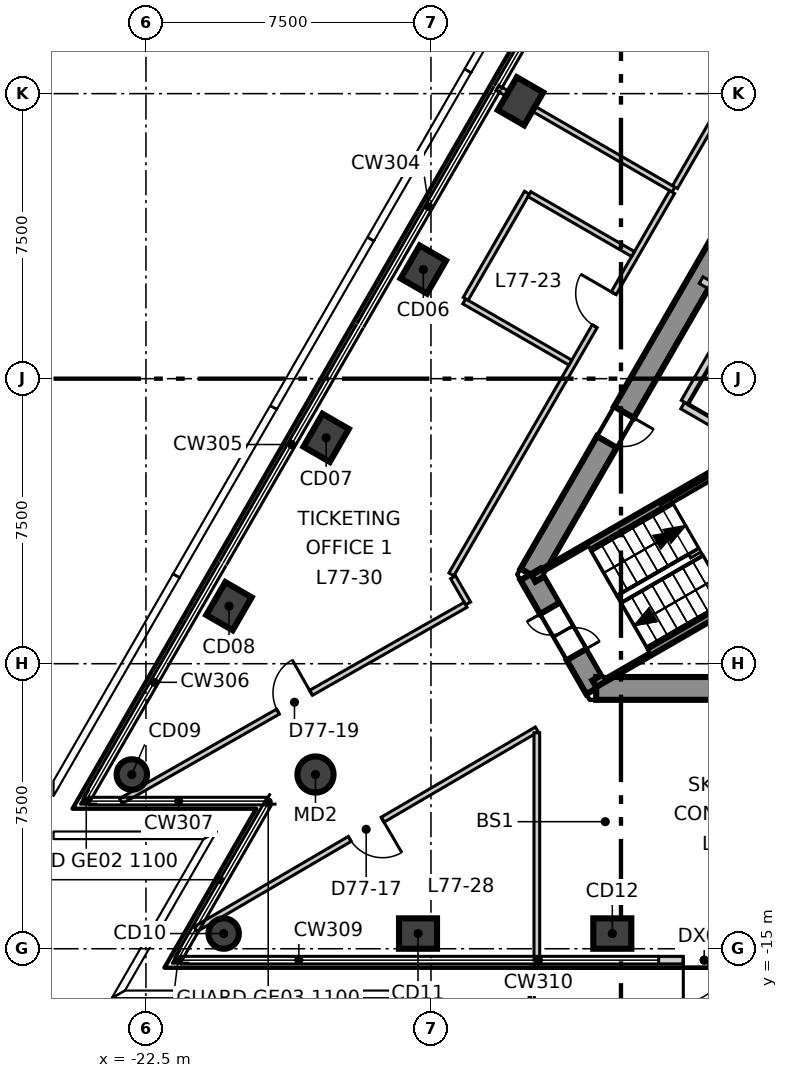
"""IFC4 building model, lengths in metres.
Left out: names, types, materials, properties, quantities, classifications, styles, units other than length and angle.
Written with IfcOpenShell. Run it as: python <this file> out.ifc"""

import sys

from ifc_helpers import new_model, si_unit, direction, frame, frame_2d, origin, origin_2d, place, context, subcontext, project, spatial, polyline, rectangle, circle, outline, extrude, element, fill, save


model = new_model("IFC4")
c1 = context("Model", 3, precision=1e-05, world=origin(), true_north=direction((0.0, 1.0)))
c2 = subcontext(c1, "Body", "Model", "MODEL_VIEW")
j1 = project(units=[si_unit("LENGTHUNIT", "METRE"), si_unit("PLANEANGLEUNIT", "RADIAN")], contexts=[c1])
p1 = place(None, origin())
s1 = spatial("IfcSite", under=j1, at=p1, CompositionType="ELEMENT")
p2 = place(p1, origin())
s2 = spatial("IfcBuilding", under=s1, at=p2, CompositionType="ELEMENT")
p3 = place(p2, frame((0.0, 0.0, 322.3)))
s3 = spatial("IfcBuildingStorey", under=s2, at=p3, CompositionType="ELEMENT", Elevation=322.3)
p4 = place(p3, frame((-1.732, 13.3, -0.3), z_axis=(0.0, 0.0, 1.0), x_axis=(-0.500000539815, -0.866025092122, 0.0)))
e1 = element("IfcWall", 1, at=p4, inside=s3, PredefinedType="SHEAR", context=c2, shape_type="SweptSolid", body=[
    extrude(outline(polyline([(-0.173, -0.3), (1.795, -0.3), (3.763, -0.3), (5.732, -0.3), (7.7, -0.3), (9.668, -0.301), (11.637, -0.301), (13.605, -0.301), (15.573, -0.301), (17.542, -0.301), (19.51, -0.301), (21.478, -0.301), (21.131, 0.3), (19.226, 0.3), (17.321, 0.3), (15.415, 0.3), (13.51, 0.3), (11.605, 0.3), (9.699, 0.3), (7.794, 0.3), (5.889, 0.3), (3.984, 0.3), (2.078, 0.3), (0.173, 0.3), (-0.173, -0.3)])), origin(), (0.0, 0.0, 1.0), 5.35),
])
p5 = place(p4, frame((10.102, 0.0, 0.3)))
e2 = element("IfcOpeningElement", 2, at=p5, cuts=e1, PredefinedType="OPENING", context=c2, shape_type="SweptSolid", body=[
    extrude(rectangle(XDim=1.1, YDim=2.1, at=frame_2d((0.55, 1.05))), frame((0.0, 0.31, 0.0), z_axis=(0.0, -1.0, 0.0), x_axis=(1.0, 0.0, 0.0)), (0.0, 0.0, 1.0), 0.621),
])
p6 = place(p4, frame((16.378, 0.0, 0.3)))
e3 = element("IfcOpeningElement", 3, at=p6, cuts=e1, PredefinedType="OPENING", context=c2, shape_type="SweptSolid", body=[
    extrude(rectangle(XDim=0.9, YDim=2.1, at=frame_2d((0.45, 1.05))), frame((0.0, 0.31, 0.0), z_axis=(0.0, -1.0, 0.0), x_axis=(1.0, 0.0, 0.0)), (0.0, 0.0, 1.0), 0.621),
])
p7 = place(p3, frame((-12.384, -5.15, -0.3), z_axis=(0.0, 0.0, 1.0), x_axis=(0.49997462182, -0.866040055388, 0.0)))
e4 = element("IfcWall", 4, at=p7, inside=s3, PredefinedType="SHEAR", context=c2, shape_type="SweptSolid", body=[
    extrude(outline(polyline([(-0.173, -0.301), (1.732, -0.301), (3.637, -0.3), (3.291, 0.3), (1.732, 0.3), (0.173, 0.3), (-0.173, -0.301)])), origin(), (0.0, 0.0, 1.0), 5.35),
])
p8 = place(p7, frame((1.032, 0.0, 0.3)))
e5 = element("IfcOpeningElement", 5, at=p8, cuts=e4, PredefinedType="OPENING", context=c2, shape_type="SweptSolid", body=[
    extrude(rectangle(XDim=1.4, YDim=2.1, at=frame_2d((0.7, 1.05))), frame((0.0, 0.31, 0.0), z_axis=(0.0, -1.0, 0.0), x_axis=(1.0, 0.0, 0.0)), (0.0, 0.0, 1.0), 0.621),
])
p9 = place(p3, frame((-10.652, -8.15, -0.3), z_axis=(0.0, 0.0, 1.0), x_axis=(1.0, 0.0, 0.0)))
e6 = element("IfcWall", 6, at=p9, inside=s3, PredefinedType="SHEAR", context=c2, shape_type="SweptSolid", body=[
    extrude(outline(polyline([(-0.173, -0.3), (1.795, -0.3), (3.763, -0.3), (5.731, -0.3), (7.7, -0.3), (9.668, -0.3), (11.636, -0.3), (13.604, -0.3), (15.573, -0.3), (17.541, -0.3), (19.509, -0.3), (21.477, -0.3), (21.131, 0.3), (19.226, 0.3), (17.321, 0.3), (15.415, 0.3), (13.51, 0.3), (11.605, 0.3), (9.699, 0.3), (7.794, 0.3), (5.889, 0.3), (3.984, 0.3), (2.078, 0.3), (0.173, 0.3), (-0.173, -0.3)])), origin(), (0.0, 0.0, 1.0), 5.35),
])
p10 = place(p9, frame((9.752, 0.0, 0.3)))
e7 = element("IfcOpeningElement", 7, at=p10, cuts=e6, PredefinedType="OPENING", context=c2, shape_type="SweptSolid", body=[
    extrude(rectangle(XDim=1.8, YDim=2.1, at=frame_2d((0.9, 1.05))), frame((0.0, 0.31, 0.0), z_axis=(0.0, -1.0, 0.0), x_axis=(1.0, 0.0, 0.0)), (0.0, 0.0, 1.0), 0.62),
])
p11 = place(p9, frame((4.026, 0.0, 0.3)))
e8 = element("IfcOpeningElement", 8, at=p11, cuts=e6, PredefinedType="OPENING", context=c2, shape_type="SweptSolid", body=[
    extrude(rectangle(XDim=0.9, YDim=2.1, at=frame_2d((0.45, 1.05))), frame((0.0, 0.31, 0.0), z_axis=(0.0, -1.0, 0.0), x_axis=(1.0, 0.0, 0.0)), (0.0, 0.0, 1.0), 0.62),
])
for number, where, z_axis, x_axis in (
    (9, (-12.644, 7.3, -0.3), (0.0, 0.0, 1.0), (0.5, 0.866, 0.0)),
    (10, (-15.201, 2.871, -0.3), (0.0, 0.0, 1.0), (0.5, 0.866, 0.0)),
    (11, (-17.758, -1.557, -0.3), (0.0, 0.0, 1.0), (0.5, 0.866, 0.0)),
    (12, (-20.315, -5.986, -0.3), (0.0, 0.0, 1.0), (0.5, 0.866, 0.0)),
):
    element("IfcColumn", number, at=place(p3, frame(where, z_axis=z_axis, x_axis=x_axis)), inside=s3, PredefinedType="COLUMN", context=c2, shape_type="SweptSolid", body=[
        extrude(rectangle(XDim=1.0, YDim=0.8, at=origin_2d()), origin(), (0.0, 0.0, 1.0), 5.35),
    ])
for number, where, z_axis, x_axis in (
    (13, (-22.872, -10.415, -0.3), (0.0, 0.0, 1.0), (0.5, 0.866, 0.0)),
    (14, (-20.455, -14.6, -0.3), (0.0, 0.0, 1.0), (1.0, 0.0, 0.0)),
):
    element("IfcColumn", number, at=place(p3, frame(where, z_axis=z_axis, x_axis=x_axis)), inside=s3, PredefinedType="COLUMN", context=c2, shape_type="SweptSolid", body=[
        extrude(circle(Radius=0.4, at=origin_2d()), origin(), (0.0, 0.0, 1.0), 5.35),
    ])
for number, where, z_axis, x_axis in (
    (15, (-15.341, -14.6, -0.3), (0.0, 0.0, 1.0), (1.0, 0.0, 0.0)),
    (16, (-10.228, -14.6, -0.3), (0.0, 0.0, 1.0), (1.0, 0.0, 0.0)),
):
    element("IfcColumn", number, at=place(p3, frame(where, z_axis=z_axis, x_axis=x_axis)), inside=s3, PredefinedType="COLUMN", context=c2, shape_type="SweptSolid", body=[
        extrude(rectangle(XDim=1.0, YDim=0.8, at=origin_2d()), origin(), (0.0, 0.0, 1.0), 5.35),
    ])
p12 = place(p3, frame((-18.039, -10.415, -0.3), z_axis=(0.0, 0.0, 1.0), x_axis=(1.0, 0.0, 0.0)))
e17 = element("IfcColumn", 17, at=p12, inside=s3, PredefinedType="COLUMN", context=c2, shape_type="SweptSolid", body=[
    extrude(circle(Radius=0.475, at=origin_2d()), origin(), (0.0, 0.0, 1.0), 5.35),
])
p13 = place(p3, frame((-9.01, -15.3, 0.0), z_axis=(0.0, 0.0, 1.0), x_axis=(1.0, 0.0, 0.0)))
e18 = element("IfcWall", 18, at=p13, inside=s3, PredefinedType="ELEMENTEDWALL", context=c2, shape_type="SweptSolid", body=[
    extrude(rectangle(XDim=2.4, YDim=0.2, at=frame_2d((1.2, 0.0))), origin(), (0.0, 0.0, 1.0), 5.05),
])
p14 = place(p13, frame((0.65, 0.0, 0.0)))
e19 = element("IfcOpeningElement", 19, at=p14, cuts=e18, PredefinedType="OPENING", context=c2, shape_type="SweptSolid", body=[
    extrude(rectangle(XDim=1.1, YDim=2.4, at=frame_2d((0.55, 1.2))), frame((0.0, 0.11, 0.0), z_axis=(0.0, -1.0, 0.0), x_axis=(1.0, 0.0, 0.0)), (0.0, 0.0, 1.0), 0.22),
])
p15 = place(p3, frame((-13.25, 7.65, 0.0), z_axis=(0.0, 0.0, 1.0), x_axis=(0.866032834954, -0.499987128616, 0.0)))
e20 = element("IfcWall", 20, at=p15, inside=s3, PredefinedType="PARTITIONING", context=c2, shape_type="SweptSolid", body=[
    extrude(rectangle(XDim=5.35, YDim=0.15, at=frame_2d((2.675, 0.0))), origin(), (0.0, 0.0, 1.0), 5.05),
])
p16 = place(p3, frame((-8.579, 5.04, 0.0), z_axis=(0.0, 0.0, 1.0), x_axis=(0.499960750514, 0.8660480633, 0.0)))
e21 = element("IfcWall", 21, at=p16, inside=s3, PredefinedType="PARTITIONING", context=c2, shape_type="SweptSolid", body=[
    extrude(rectangle(XDim=11.529, YDim=0.15, at=frame_2d((5.765, 0.0))), origin(), (0.0, 0.0, 1.0), 5.05),
])
p17 = place(p16, frame((5.17, 0.0, 0.0)))
e22 = element("IfcOpeningElement", 22, at=p17, cuts=e21, PredefinedType="OPENING", context=c2, shape_type="SweptSolid", body=[
    extrude(rectangle(XDim=1.2, YDim=2.1, at=frame_2d((0.6, 1.05))), frame((0.0, 0.085, 0.0), z_axis=(0.0, -1.0, 0.0), x_axis=(1.0, 0.0, 0.0)), (0.0, 0.0, 1.0), 0.17),
])
p18 = place(p3, frame((-14.463, -5.15, 0.0), z_axis=(0.0, 0.0, 1.0), x_axis=(0.50005173435, 0.865995532883, 0.0)))
e23 = element("IfcWall", 23, at=p18, inside=s3, PredefinedType="PARTITIONING", context=c2, shape_type="SweptSolid", body=[
    extrude(rectangle(XDim=11.616, YDim=0.15, at=frame_2d((5.808, 0.0))), origin(), (0.0, 0.0, 1.0), 5.05),
])
p19 = place(p18, frame((7.542, 0.0, 0.0)))
e24 = element("IfcOpeningElement", 24, at=p19, cuts=e23, PredefinedType="OPENING", context=c2, shape_type="SweptSolid", body=[
    extrude(rectangle(XDim=1.0, YDim=2.1, at=frame_2d((0.5, 1.05))), frame((0.0, 0.085, 0.0), z_axis=(0.0, -1.0, 0.0), x_axis=(1.0, 0.0, 0.0)), (0.0, 0.0, 1.0), 0.17),
])
p20 = place(p3, frame((-14.419, -5.225, 0.0), z_axis=(0.0, 0.0, 1.0), x_axis=(0.500308355439, -0.865847301479, 0.0)))
e25 = element("IfcWall", 25, at=p20, inside=s3, PredefinedType="PARTITIONING", context=c2, shape_type="SweptSolid", body=[
    extrude(rectangle(XDim=0.793, YDim=0.15, at=frame_2d((0.397, 0.0))), origin(), (0.0, 0.0, 1.0), 5.05),
])
p21 = place(p3, frame((-23.16, -11.115, 0.0), z_axis=(0.0, 0.0, 1.0), x_axis=(0.869024974593, 0.494768222032, 0.0)))
e26 = element("IfcWall", 26, at=p21, inside=s3, PredefinedType="PARTITIONING", context=c2, shape_type="SweptSolid", body=[
    extrude(rectangle(XDim=10.439, YDim=0.15, at=frame_2d((5.22, 0.0))), origin(), (0.0, 0.0, 1.0), 5.05),
])
p22 = place(p21, frame((4.757, 0.0, 0.0)))
e27 = element("IfcOpeningElement", 27, at=p22, cuts=e26, PredefinedType="OPENING", context=c2, shape_type="SweptSolid", body=[
    extrude(rectangle(XDim=1.0, YDim=2.1, at=frame_2d((0.5, 1.05))), frame((0.0, 0.085, 0.0), z_axis=(0.0, -1.0, 0.0), x_axis=(1.0, 0.0, 0.0)), (0.0, 0.0, 1.0), 0.17),
])
p23 = place(p3, frame((-21.197, -14.485, 0.0), z_axis=(0.0, 0.0, 1.0), x_axis=(0.863146898816, 0.504952899848, 0.0)))
e28 = element("IfcWall", 28, at=p23, inside=s3, PredefinedType="PARTITIONING", context=c2, shape_type="SweptSolid", body=[
    extrude(rectangle(XDim=10.407, YDim=0.15, at=frame_2d((5.204, 0.0))), origin(), (0.0, 0.0, 1.0), 5.05),
])
p24 = place(p23, frame((4.704, 0.0, 0.0)))
e29 = element("IfcOpeningElement", 29, at=p24, cuts=e28, PredefinedType="OPENING", context=c2, shape_type="SweptSolid", body=[
    extrude(rectangle(XDim=1.0, YDim=2.1, at=frame_2d((0.5, 1.05))), frame((0.0, 0.085, 0.0), z_axis=(0.0, -1.0, 0.0), x_axis=(1.0, 0.0, 0.0)), (0.0, 0.0, 1.0), 0.17),
])
p25 = place(p3, frame((-12.214, -15.3, 0.0), z_axis=(0.0, 0.0, 1.0), x_axis=(0.0, 1.0, 0.0)))
e30 = element("IfcWall", 30, at=p25, inside=s3, PredefinedType="PARTITIONING", context=c2, shape_type="SweptSolid", body=[
    extrude(rectangle(XDim=5.983, YDim=0.15, at=frame_2d((2.992, 0.0))), origin(), (0.0, 0.0, 1.0), 5.05),
])
for number, where, z_axis, x_axis in (
    (31, (-14.125, 2.035, 0.0), (0.0, 0.0, 1.0), (0.866, -0.5, 0.0)),
    (32, (-14.087, 2.1, 0.0), (0.0, 0.0, 1.0), (0.5, 0.866, 0.0)),
):
    element("IfcWall", number, at=place(p3, frame(where, z_axis=z_axis, x_axis=x_axis)), inside=s3, PredefinedType="PARTITIONING", context=c2, shape_type="SweptSolid", body=[
        extrude(rectangle(XDim=3.225, YDim=0.15, at=frame_2d((1.612, 0.0))), origin(), (0.0, 0.0, 1.0), 5.05),
    ])
p26 = place(p3, frame((-12.41, 4.855, 0.0), z_axis=(0.0, 0.0, 1.0), x_axis=(0.866035871367, -0.499981869177, 0.0)))
e33 = element("IfcWall", 33, at=p26, inside=s3, PredefinedType="PARTITIONING", context=c2, shape_type="SweptSolid", body=[
    extrude(rectangle(XDim=3.15, YDim=0.15, at=frame_2d((1.575, 0.0))), origin(), (0.0, 0.0, 1.0), 5.05),
])
p27 = place(p3, frame((-8.376, -0.707, 0.0), z_axis=(0.0, 0.0, 1.0), x_axis=(0.866067520717, -0.499927044236, 0.0)))
e34 = element("IfcWall", 34, at=p27, inside=s3, PredefinedType="SOLIDWALL", context=c2, shape_type="SweptSolid", body=[
    extrude(rectangle(XDim=2.1, YDim=0.2, at=frame_2d((1.05, 0.0))), origin(), (0.0, 0.0, 1.0), 5.05),
])
p28 = place(p3, frame((-8.326, -0.62, 0.0), z_axis=(0.0, 0.0, 1.0), x_axis=(0.500023687443, 0.866011727401, 0.0)))
e35 = element("IfcWall", 35, at=p28, inside=s3, PredefinedType="SOLIDWALL", context=c2, shape_type="SweptSolid", body=[
    extrude(rectangle(XDim=2.9, YDim=0.2, at=frame_2d((1.45, 0.0))), origin(), (0.0, 0.0, 1.0), 5.05),
])
p29 = place(p3, frame((-7.891, 2.593, 0.0), z_axis=(0.0, 0.0, 1.0), x_axis=(0.866070917804, -0.499921159118, 0.0)))
e36 = element("IfcWall", 36, at=p29, inside=s3, PredefinedType="SOLIDWALL", context=c2, shape_type="SweptSolid", body=[
    extrude(rectangle(XDim=3.333, YDim=0.2, at=frame_2d((1.666, 0.0))), origin(), (0.0, 0.0, 1.0), 5.05),
])
p30 = place(p29, frame((1.73, 0.0, 0.0)))
e37 = element("IfcOpeningElement", 37, at=p30, cuts=e36, PredefinedType="OPENING", context=c2, shape_type="SweptSolid", body=[
    extrude(rectangle(XDim=1.1, YDim=2.1, at=frame_2d((0.55, 1.05))), frame((0.0, 0.11, 0.0), z_axis=(0.0, -1.0, 0.0), x_axis=(1.0, 0.0, 0.0)), (0.0, 0.0, 1.0), 0.22),
])
p31 = place(p3, frame((-12.301, -5.254, 0.0), z_axis=(0.0, 0.0, 1.0), x_axis=(0.866068467981, 0.499925403204, 0.0)))
e38 = element("IfcWall", 38, at=p31, inside=s3, PredefinedType="SOLIDWALL", context=c2, shape_type="SweptSolid", body=[
    extrude(rectangle(XDim=6.665, YDim=0.2, at=frame_2d((3.332, 0.0))), origin(), (0.0, 0.0, 1.0), 5.05),
])
p32 = place(p3, frame((-10.701, -8.026, 0.0), z_axis=(0.0, 0.0, 1.0), x_axis=(0.866005022404, 0.500035299925, 0.0)))
e39 = element("IfcWall", 39, at=p32, inside=s3, PredefinedType="SOLIDWALL", context=c2, shape_type="SweptSolid", body=[
    extrude(rectangle(XDim=6.665, YDim=0.2, at=frame_2d((3.333, 0.0))), origin(), (0.0, 0.0, 1.0), 5.05),
])
p33 = place(p14, frame((1.1, 0.0, 0.0), z_axis=(0.0, 0.0, 1.0), x_axis=(-1.0, 0.0, 0.0)))
e40 = element("IfcDoor", 40, at=p33, inside=s3, OperationType="SINGLE_SWING_RIGHT", PredefinedType="DOOR", context=c2, shape_type="SweptSolid", body=[
    extrude(rectangle(XDim=1.1, YDim=2.4, at=frame_2d((0.55, 1.2))), frame((0.0, 0.025, 0.0), z_axis=(0.0, -1.0, 0.0), x_axis=(1.0, 0.0, 0.0)), (0.0, 0.0, 1.0), 0.05),
])
fill(e19, e40)
p34 = place(p19, origin())
e41 = element("IfcDoor", 41, at=p34, inside=s3, OperationType="SINGLE_SWING_LEFT", PredefinedType="DOOR", context=c2, shape_type="SweptSolid", body=[
    extrude(rectangle(XDim=1.0, YDim=2.1, at=frame_2d((0.5, 1.05))), frame((0.0, 0.025, 0.0), z_axis=(0.0, -1.0, 0.0), x_axis=(1.0, 0.0, 0.0)), (0.0, 0.0, 1.0), 0.05),
])
fill(e24, e41)
p35 = place(p24, origin())
e42 = element("IfcDoor", 42, at=p35, inside=s3, OperationType="SINGLE_SWING_RIGHT", PredefinedType="DOOR", context=c2, shape_type="SweptSolid", body=[
    extrude(rectangle(XDim=1.0, YDim=2.1, at=frame_2d((0.5, 1.05))), frame((0.0, 0.025, 0.0), z_axis=(0.0, -1.0, 0.0), x_axis=(1.0, 0.0, 0.0)), (0.0, 0.0, 1.0), 0.05),
])
fill(e29, e42)
p36 = place(p22, origin())
e43 = element("IfcDoor", 43, at=p36, inside=s3, OperationType="SINGLE_SWING_LEFT", PredefinedType="DOOR", context=c2, shape_type="SweptSolid", body=[
    extrude(rectangle(XDim=1.0, YDim=2.1, at=frame_2d((0.5, 1.05))), frame((0.0, 0.025, 0.0), z_axis=(0.0, -1.0, 0.0), x_axis=(1.0, 0.0, 0.0)), (0.0, 0.0, 1.0), 0.05),
])
fill(e27, e43)
p37 = place(p8, origin())
e44 = element("IfcDoor", 44, at=p37, inside=s3, OperationType="DOUBLE_DOOR_SINGLE_SWING", PredefinedType="DOOR", context=c2, shape_type="SweptSolid", body=[
    extrude(rectangle(XDim=1.4, YDim=2.1, at=frame_2d((0.7, 1.05))), frame((0.0, 0.025, 0.0), z_axis=(0.0, -1.0, 0.0), x_axis=(1.0, 0.0, 0.0)), (0.0, 0.0, 1.0), 0.05),
])
fill(e5, e44)
p38 = place(p6, origin())
e45 = element("IfcDoor", 45, at=p38, inside=s3, OperationType="SINGLE_SWING_RIGHT", PredefinedType="DOOR", context=c2, shape_type="SweptSolid", body=[
    extrude(rectangle(XDim=0.9, YDim=2.1, at=frame_2d((0.45, 1.05))), frame((0.0, 0.025, 0.0), z_axis=(0.0, -1.0, 0.0), x_axis=(1.0, 0.0, 0.0)), (0.0, 0.0, 1.0), 0.05),
])
fill(e3, e45)
save(model, sys.argv[1])
